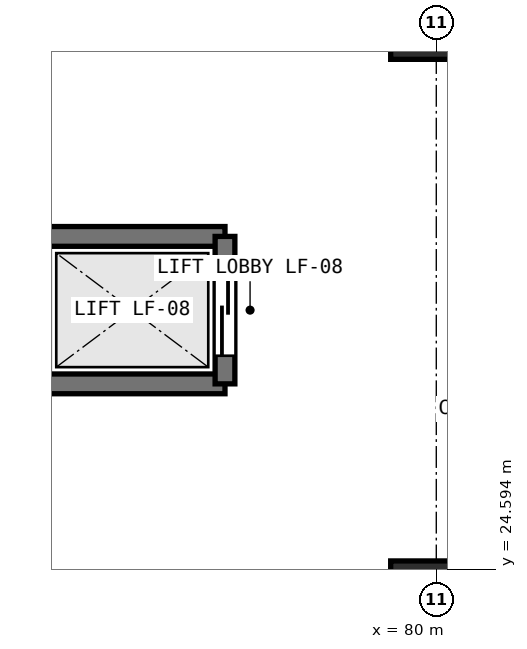
"""IFC4 building model, lengths in metres.
Left out: names, types, materials, properties, quantities, classifications, styles, units other than length and angle.
Written with IfcOpenShell. Run it as: python <this file> out.ifc"""

import sys

from ifc_helpers import new_model, si_unit, direction, frame, frame_2d, origin, origin_2d, place, context, subcontext, project, spatial, rectangle, extrude, element, fill, save


model = new_model("IFC4")
c1 = context("Model", 3, precision=1e-05, world=origin(), true_north=direction((0.0, 1.0)))
c2 = subcontext(c1, "Body", "Model", "MODEL_VIEW")
j1 = project(units=[si_unit("LENGTHUNIT", "METRE"), si_unit("PLANEANGLEUNIT", "RADIAN")], contexts=[c1])
p1 = place(None, origin())
s1 = spatial("IfcSite", under=j1, at=p1, CompositionType="ELEMENT")
p2 = place(p1, origin())
s2 = spatial("IfcBuilding", under=s1, at=p2, CompositionType="ELEMENT")
p3 = place(p2, frame((0.0, 0.0, -4.8)))
s3 = spatial("IfcBuildingStorey", under=s2, at=p3, CompositionType="ELEMENT", Elevation=-4.8)
for number, where, z_axis, x_axis in (
    (1, (80.0, 24.0, 0.0), (0.0, 0.0, 1.0), (1.0, 0.0, 0.0)),
    (2, (80.0, 32.0, 0.0), (0.0, 0.0, 1.0), (1.0, 0.0, 0.0)),
):
    element("IfcColumn", number, at=place(p3, frame(where, z_axis=z_axis, x_axis=x_axis)), inside=s3, PredefinedType="COLUMN", context=c2, shape_type="SweptSolid", body=[
        extrude(rectangle(XDim=1.2, YDim=1.4, at=origin_2d()), origin(), (0.0, 0.0, 1.0), 4.8),
    ])
for number, where, z_axis, x_axis in (
    (3, (74.78, 28.97, 0.0), (0.0, 0.0, 1.0), (1.0, 0.0, 0.0)),
    (4, (77.22, 27.03, 0.0), (0.0, 0.0, 1.0), (-1.0, 0.0, 0.0)),
):
    element("IfcWall", number, at=place(p3, frame(where, z_axis=z_axis, x_axis=x_axis)), inside=s3, PredefinedType="SHEAR", context=c2, shape_type="SweptSolid", body=[
        extrude(rectangle(XDim=2.44, YDim=0.26, at=frame_2d((1.22, 0.0))), origin(), (0.0, 0.0, 1.0), 4.46),
    ])
p4 = place(p3, frame((77.22, 28.97, 0.0), z_axis=(0.0, 0.0, 1.0), x_axis=(0.0, -1.0, 0.0)))
e5 = element("IfcWall", 5, at=p4, inside=s3, PredefinedType="SHEAR", context=c2, shape_type="SweptSolid", body=[
    extrude(rectangle(XDim=1.94, YDim=0.26, at=frame_2d((0.97, 0.0))), origin(), (0.0, 0.0, 1.0), 4.46),
])
p5 = place(p4, frame((0.37, 0.0, 0.0)))
e6 = element("IfcOpeningElement", 6, at=p5, cuts=e5, PredefinedType="OPENING", context=c2, shape_type="SweptSolid", body=[
    extrude(rectangle(XDim=1.2, YDim=2.15, at=frame_2d((0.6, 1.075))), frame((0.0, 0.14, 0.0), z_axis=(0.0, -1.0, 0.0), x_axis=(1.0, 0.0, 0.0)), (0.0, 0.0, 1.0), 0.28),
])
p6 = place(p5, origin())
e7 = element("IfcDoor", 7, at=p6, inside=s3, OperationType="SLIDING_TO_LEFT", PredefinedType="DOOR", context=c2, shape_type="SweptSolid", body=[
    extrude(rectangle(XDim=1.2, YDim=2.15, at=frame_2d((0.6, 1.075))), frame((0.0, 0.025, 0.0), z_axis=(0.0, -1.0, 0.0), x_axis=(1.0, 0.0, 0.0)), (0.0, 0.0, 1.0), 0.05),
])
fill(e6, e7)
save(model, sys.argv[1])
